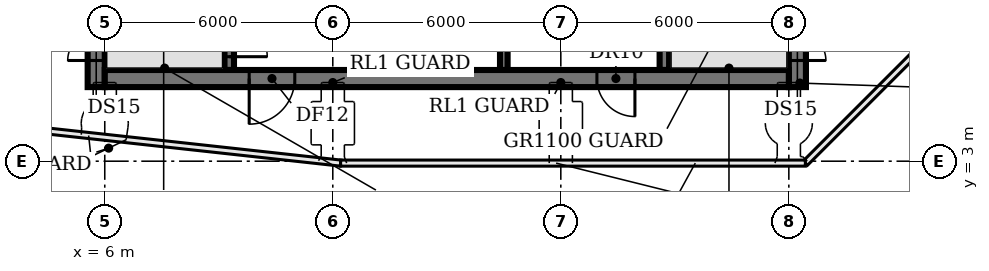
"""IFC4 building model, lengths in metres.
Left out: names, types, materials, properties, quantities, classifications, styles, units other than length and angle.
Written with IfcOpenShell. Run it as: python <this file> out.ifc"""

import sys

from ifc_helpers import new_model, si_unit, direction, frame, frame_2d, origin, place, context, subcontext, project, spatial, rectangle, extrude, element, fill, save


model = new_model("IFC4")
c1 = context("Model", 3, precision=1e-05, world=origin(), true_north=direction((0.0, 1.0)))
c2 = subcontext(c1, "Body", "Model", "MODEL_VIEW")
j1 = project(units=[si_unit("LENGTHUNIT", "METRE"), si_unit("PLANEANGLEUNIT", "RADIAN")], contexts=[c1])
p1 = place(None, origin())
s1 = spatial("IfcSite", under=j1, at=p1, CompositionType="ELEMENT")
p2 = place(p1, origin())
s2 = spatial("IfcBuilding", under=s1, at=p2, CompositionType="ELEMENT")
p3 = place(p2, frame((0.0, 0.0, 255.8)))
s3 = spatial("IfcBuildingStorey", under=s2, at=p3, CompositionType="ELEMENT", Elevation=255.8)
p4 = place(p3, frame((9.275, 11.825, 0.0), z_axis=(0.0, 0.0, 1.0), x_axis=(0.0, -1.0, 0.0)))
e1 = element("IfcWall", 1, at=p4, inside=s3, PredefinedType="SHEAR", context=c2, shape_type="SweptSolid", body=[
    extrude(rectangle(XDim=6.425, YDim=0.25, at=frame_2d((3.212, 0.0))), origin(), (0.0, 0.0, 1.0), 8.05),
])
p5 = place(p4, frame((5.075, 0.0, 0.0)))
e2 = element("IfcOpeningElement", 2, at=p5, cuts=e1, PredefinedType="OPENING", context=c2, shape_type="SweptSolid", body=[
    extrude(rectangle(XDim=1.0, YDim=2.1, at=frame_2d((0.5, 1.05))), frame((0.0, 0.135, 0.0), z_axis=(0.0, -1.0, 0.0), x_axis=(1.0, 0.0, 0.0)), (0.0, 0.0, 1.0), 0.27),
])
p6 = place(p3, frame((13.5, 5.4, 0.0), z_axis=(0.0, 0.0, 1.0), x_axis=(0.0, 1.0, 0.0)))
e3 = element("IfcWall", 3, at=p6, inside=s3, PredefinedType="SHEAR", context=c2, shape_type="SweptSolid", body=[
    extrude(rectangle(XDim=8.2, YDim=0.2, at=frame_2d((4.1, 0.0))), origin(), (0.0, 0.0, 1.0), 8.05),
])
p7 = place(p6, frame((0.75, 0.0, 0.0)))
e4 = element("IfcOpeningElement", 4, at=p7, cuts=e3, PredefinedType="OPENING", context=c2, shape_type="SweptSolid", body=[
    extrude(rectangle(XDim=1.1, YDim=2.1, at=frame_2d((0.55, 1.05))), frame((0.0, 0.11, 0.0), z_axis=(0.0, -1.0, 0.0), x_axis=(1.0, 0.0, 0.0)), (0.0, 0.0, 1.0), 0.22),
])
p8 = place(p6, frame((3.55, 0.0, 0.0)))
e5 = element("IfcOpeningElement", 5, at=p8, cuts=e3, PredefinedType="OPENING", context=c2, shape_type="SweptSolid", body=[
    extrude(rectangle(XDim=1.1, YDim=2.1, at=frame_2d((0.55, 1.05))), frame((0.0, 0.11, 0.0), z_axis=(0.0, -1.0, 0.0), x_axis=(1.0, 0.0, 0.0)), (0.0, 0.0, 1.0), 0.22),
])
p9 = place(p6, frame((6.35, 0.0, 0.0)))
e6 = element("IfcOpeningElement", 6, at=p9, cuts=e3, PredefinedType="OPENING", context=c2, shape_type="SweptSolid", body=[
    extrude(rectangle(XDim=1.1, YDim=2.1, at=frame_2d((0.55, 1.05))), frame((0.0, 0.11, 0.0), z_axis=(0.0, -1.0, 0.0), x_axis=(1.0, 0.0, 0.0)), (0.0, 0.0, 1.0), 0.22),
])
p10 = place(p3, frame((16.5, 5.4, 0.0), z_axis=(0.0, 0.0, 1.0), x_axis=(0.0, 1.0, 0.0)))
e7 = element("IfcWall", 7, at=p10, inside=s3, PredefinedType="SHEAR", context=c2, shape_type="SweptSolid", body=[
    extrude(rectangle(XDim=8.2, YDim=0.2, at=frame_2d((4.1, 0.0))), origin(), (0.0, 0.0, 1.0), 8.05),
])
p11 = place(p3, frame((20.725, 5.4, 0.0), z_axis=(0.0, 0.0, 1.0), x_axis=(0.0, 1.0, 0.0)))
e8 = element("IfcWall", 8, at=p11, inside=s3, PredefinedType="SHEAR", context=c2, shape_type="SweptSolid", body=[
    extrude(rectangle(XDim=6.3, YDim=0.25, at=frame_2d((3.15, 0.0))), origin(), (0.0, 0.0, 1.0), 8.05),
])
p12 = place(p3, frame((5.775, 4.95, 0.0), z_axis=(0.0, 0.0, 1.0), x_axis=(0.0, 1.0, 0.0)))
e9 = element("IfcWall", 9, at=p12, inside=s3, PredefinedType="SHEAR", context=c2, shape_type="SweptSolid", body=[
    extrude(rectangle(XDim=20.3, YDim=0.45, at=frame_2d((10.15, 0.0))), origin(), (0.0, 0.0, 1.0), 8.05),
])
p13 = place(p12, frame((0.7, 0.0, 0.0)))
e10 = element("IfcOpeningElement", 10, at=p13, cuts=e9, PredefinedType="OPENING", context=c2, shape_type="SweptSolid", body=[
    extrude(rectangle(XDim=1.5, YDim=2.1, at=frame_2d((0.75, 1.05))), frame((0.0, 0.235, 0.0), z_axis=(0.0, -1.0, 0.0), x_axis=(1.0, 0.0, 0.0)), (0.0, 0.0, 1.0), 0.47),
])
p14 = place(p12, frame((7.15, 0.0, 0.0)))
e11 = element("IfcOpeningElement", 11, at=p14, cuts=e9, PredefinedType="OPENING", context=c2, shape_type="SweptSolid", body=[
    extrude(rectangle(XDim=1.2, YDim=2.1, at=frame_2d((0.6, 1.05))), frame((0.0, 0.235, 0.0), z_axis=(0.0, -1.0, 0.0), x_axis=(1.0, 0.0, 0.0)), (0.0, 0.0, 1.0), 0.47),
])
p15 = place(p12, frame((13.7, 0.0, 0.0)))
e12 = element("IfcOpeningElement", 12, at=p15, cuts=e9, PredefinedType="OPENING", context=c2, shape_type="SweptSolid", body=[
    extrude(rectangle(XDim=1.2, YDim=2.1, at=frame_2d((0.6, 1.05))), frame((0.0, 0.235, 0.0), z_axis=(0.0, -1.0, 0.0), x_axis=(1.0, 0.0, 0.0)), (0.0, 0.0, 1.0), 0.47),
])
p16 = place(p3, frame((24.225, 25.25, 0.0), z_axis=(0.0, 0.0, 1.0), x_axis=(0.0, -1.0, 0.0)))
e13 = element("IfcWall", 13, at=p16, inside=s3, PredefinedType="SHEAR", context=c2, shape_type="SweptSolid", body=[
    extrude(rectangle(XDim=20.3, YDim=0.45, at=frame_2d((10.15, 0.0))), origin(), (0.0, 0.0, 1.0), 8.05),
])
p17 = place(p16, frame((18.1, 0.0, 0.0)))
e14 = element("IfcOpeningElement", 14, at=p17, cuts=e13, PredefinedType="OPENING", context=c2, shape_type="SweptSolid", body=[
    extrude(rectangle(XDim=1.5, YDim=2.1, at=frame_2d((0.75, 1.05))), frame((0.0, 0.235, 0.0), z_axis=(0.0, -1.0, 0.0), x_axis=(1.0, 0.0, 0.0)), (0.0, 0.0, 1.0), 0.47),
])
p18 = place(p16, frame((12.0, 0.0, 0.0)))
e15 = element("IfcOpeningElement", 15, at=p18, cuts=e13, PredefinedType="OPENING", context=c2, shape_type="SweptSolid", body=[
    extrude(rectangle(XDim=0.9, YDim=2.1, at=frame_2d((0.45, 1.05))), frame((0.0, 0.235, 0.0), z_axis=(0.0, -1.0, 0.0), x_axis=(1.0, 0.0, 0.0)), (0.0, 0.0, 1.0), 0.47),
])
p19 = place(p16, frame((6.0, 0.0, 0.0)))
e16 = element("IfcOpeningElement", 16, at=p19, cuts=e13, PredefinedType="OPENING", context=c2, shape_type="SweptSolid", body=[
    extrude(rectangle(XDim=2.0, YDim=2.1, at=frame_2d((1.0, 1.05))), frame((0.0, 0.235, 0.0), z_axis=(0.0, -1.0, 0.0), x_axis=(1.0, 0.0, 0.0)), (0.0, 0.0, 1.0), 0.47),
])
p20 = place(p3, frame((24.0, 5.175, 0.0), z_axis=(0.0, 0.0, 1.0), x_axis=(-1.0, 0.0, 0.0)))
e17 = element("IfcWall", 17, at=p20, inside=s3, PredefinedType="SHEAR", context=c2, shape_type="SweptSolid", body=[
    extrude(rectangle(XDim=18.0, YDim=0.45, at=frame_2d((9.0, 0.0))), origin(), (0.0, 0.0, 1.0), 8.05),
])
p21 = place(p20, frame((13.0, 0.0, 0.0)))
e18 = element("IfcOpeningElement", 18, at=p21, cuts=e17, PredefinedType="OPENING", context=c2, shape_type="SweptSolid", body=[
    extrude(rectangle(XDim=1.2, YDim=2.1, at=frame_2d((0.6, 1.05))), frame((0.0, 0.235, 0.0), z_axis=(0.0, -1.0, 0.0), x_axis=(1.0, 0.0, 0.0)), (0.0, 0.0, 1.0), 0.47),
])
p22 = place(p20, frame((4.05, 0.0, 0.0)))
e19 = element("IfcOpeningElement", 19, at=p22, cuts=e17, PredefinedType="OPENING", context=c2, shape_type="SweptSolid", body=[
    extrude(rectangle(XDim=1.0, YDim=2.1, at=frame_2d((0.5, 1.05))), frame((0.0, 0.235, 0.0), z_axis=(0.0, -1.0, 0.0), x_axis=(1.0, 0.0, 0.0)), (0.0, 0.0, 1.0), 0.47),
])
p23 = place(p5, origin())
e20 = element("IfcDoor", 20, at=p23, inside=s3, OperationType="SINGLE_SWING_RIGHT", PredefinedType="DOOR", context=c2, shape_type="SweptSolid", body=[
    extrude(rectangle(XDim=1.0, YDim=2.1, at=frame_2d((0.5, 1.05))), frame((0.0, 0.025, 0.0), z_axis=(0.0, -1.0, 0.0), x_axis=(1.0, 0.0, 0.0)), (0.0, 0.0, 1.0), 0.05),
])
fill(e2, e20)
p24 = place(p13, origin())
e21 = element("IfcDoor", 21, at=p24, inside=s3, OperationType="DOUBLE_DOOR_SINGLE_SWING", PredefinedType="DOOR", context=c2, shape_type="SweptSolid", body=[
    extrude(rectangle(XDim=1.5, YDim=2.1, at=frame_2d((0.75, 1.05))), frame((0.0, 0.025, 0.0), z_axis=(0.0, -1.0, 0.0), x_axis=(1.0, 0.0, 0.0)), (0.0, 0.0, 1.0), 0.05),
])
fill(e10, e21)
p25 = place(p17, origin())
e22 = element("IfcDoor", 22, at=p25, inside=s3, OperationType="DOUBLE_DOOR_SINGLE_SWING", PredefinedType="DOOR", context=c2, shape_type="SweptSolid", body=[
    extrude(rectangle(XDim=1.5, YDim=2.1, at=frame_2d((0.75, 1.05))), frame((0.0, 0.025, 0.0), z_axis=(0.0, -1.0, 0.0), x_axis=(1.0, 0.0, 0.0)), (0.0, 0.0, 1.0), 0.05),
])
fill(e14, e22)
p26 = place(p21, origin())
e23 = element("IfcDoor", 23, at=p26, inside=s3, OperationType="SINGLE_SWING_RIGHT", PredefinedType="DOOR", context=c2, shape_type="SweptSolid", body=[
    extrude(rectangle(XDim=1.2, YDim=2.1, at=frame_2d((0.6, 1.05))), frame((0.0, 0.025, 0.0), z_axis=(0.0, -1.0, 0.0), x_axis=(1.0, 0.0, 0.0)), (0.0, 0.0, 1.0), 0.05),
])
fill(e18, e23)
p27 = place(p22, origin())
e24 = element("IfcDoor", 24, at=p27, inside=s3, OperationType="SINGLE_SWING_LEFT", PredefinedType="DOOR", context=c2, shape_type="SweptSolid", body=[
    extrude(rectangle(XDim=1.0, YDim=2.1, at=frame_2d((0.5, 1.05))), frame((0.0, 0.025, 0.0), z_axis=(0.0, -1.0, 0.0), x_axis=(1.0, 0.0, 0.0)), (0.0, 0.0, 1.0), 0.05),
])
fill(e19, e24)
save(model, sys.argv[1])
